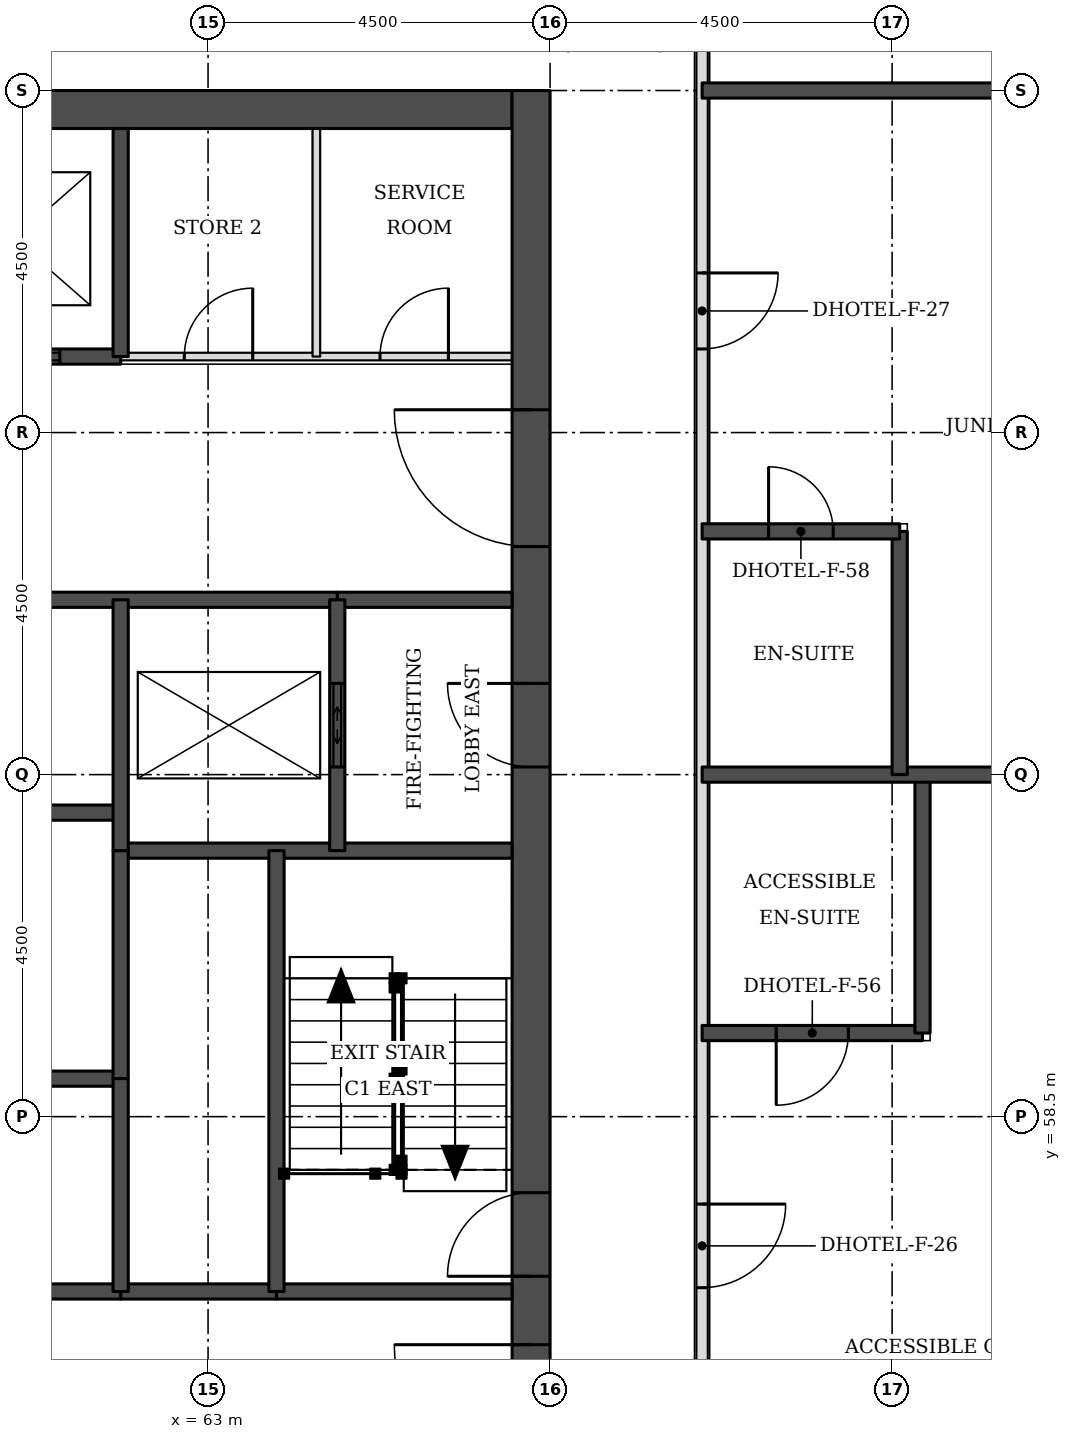
"""IFC4 building model, lengths in metres.
Left out: names, types, materials, properties, quantities, classifications, styles, units other than length and angle.
Written with IfcOpenShell. Run it as: python <this file> out.ifc"""

import sys

from ifc_helpers import new_model, si_unit, direction, frame, frame_2d, origin, place, context, subcontext, project, spatial, rectangle, extrude, element, fill, save


model = new_model("IFC4")
c1 = context("Model", 3, precision=1e-05, world=origin(), true_north=direction((0.0, 1.0)))
c2 = subcontext(c1, "Body", "Model", "MODEL_VIEW")
j1 = project(units=[si_unit("LENGTHUNIT", "METRE"), si_unit("PLANEANGLEUNIT", "RADIAN")], contexts=[c1])
p1 = place(None, origin())
s1 = spatial("IfcSite", under=j1, at=p1, CompositionType="ELEMENT")
p2 = place(p1, origin())
s2 = spatial("IfcBuilding", under=s1, at=p2, CompositionType="ELEMENT")
p3 = place(p2, frame((0.0, 0.0, 42.9)))
s3 = spatial("IfcBuildingStorey", under=s2, at=p3, CompositionType="ELEMENT", Elevation=42.9)
p4 = place(p3, frame((45.5, 71.75, 0.0), z_axis=(0.0, 0.0, 1.0), x_axis=(1.0, 0.0, 0.0)))
e1 = element("IfcWall", 1, at=p4, inside=s3, PredefinedType="SHEAR", context=c2, shape_type="SweptSolid", body=[
    extrude(rectangle(XDim=21.5, YDim=0.5, at=frame_2d((10.75, 0.0))), origin(), (0.0, 0.0, 1.0), 3.3),
])
p5 = place(p3, frame((67.25, 49.5, 0.0), z_axis=(0.0, 0.0, 1.0), x_axis=(0.0, 1.0, 0.0)))
e2 = element("IfcWall", 2, at=p5, inside=s3, PredefinedType="SHEAR", context=c2, shape_type="SweptSolid", body=[
    extrude(rectangle(XDim=22.5, YDim=0.5, at=frame_2d((11.25, 0.0))), origin(), (0.0, 0.0, 1.0), 3.3),
])
p6 = place(p5, frame((4.2, 0.0, 0.0)))
e3 = element("IfcOpeningElement", 3, at=p6, cuts=e2, PredefinedType="OPENING", context=c2, shape_type="SweptSolid", body=[
    extrude(rectangle(XDim=1.8, YDim=2.1, at=frame_2d((0.9, 1.05))), frame((0.0, 0.26, 0.0), z_axis=(0.0, -1.0, 0.0), x_axis=(1.0, 0.0, 0.0)), (0.0, 0.0, 1.0), 0.52),
])
p7 = place(p5, frame((6.9, 0.0, 0.0)))
e4 = element("IfcOpeningElement", 4, at=p7, cuts=e2, PredefinedType="OPENING", context=c2, shape_type="SweptSolid", body=[
    extrude(rectangle(XDim=1.1, YDim=2.1, at=frame_2d((0.55, 1.05))), frame((0.0, 0.26, 0.0), z_axis=(0.0, -1.0, 0.0), x_axis=(1.0, 0.0, 0.0)), (0.0, 0.0, 1.0), 0.52),
])
p8 = place(p5, frame((13.6, 0.0, 0.0)))
e5 = element("IfcOpeningElement", 5, at=p8, cuts=e2, PredefinedType="OPENING", context=c2, shape_type="SweptSolid", body=[
    extrude(rectangle(XDim=1.1, YDim=2.1, at=frame_2d((0.55, 1.05))), frame((0.0, 0.26, 0.0), z_axis=(0.0, -1.0, 0.0), x_axis=(1.0, 0.0, 0.0)), (0.0, 0.0, 1.0), 0.52),
])
p9 = place(p5, frame((16.5, 0.0, 0.0)))
e6 = element("IfcOpeningElement", 6, at=p9, cuts=e2, PredefinedType="OPENING", context=c2, shape_type="SweptSolid", body=[
    extrude(rectangle(XDim=1.8, YDim=2.1, at=frame_2d((0.9, 1.05))), frame((0.0, 0.26, 0.0), z_axis=(0.0, -1.0, 0.0), x_axis=(1.0, 0.0, 0.0)), (0.0, 0.0, 1.0), 0.52),
])
p10 = place(p3, frame((69.5, 47.5, 0.0), z_axis=(0.0, 0.0, 1.0), x_axis=(0.0, 1.0, 0.0)))
e7 = element("IfcWall", 7, at=p10, inside=s3, PredefinedType="PARTITIONING", context=c2, shape_type="SweptSolid", body=[
    extrude(rectangle(XDim=26.5, YDim=0.15, at=frame_2d((13.25, 0.0))), origin(), (0.0, 0.0, 1.0), 3.08),
])
p11 = place(p10, frame((25.053, 0.0, 0.0)))
e8 = element("IfcOpeningElement", 8, at=p11, cuts=e7, PredefinedType="OPENING", context=c2, shape_type="SweptSolid", body=[
    extrude(rectangle(XDim=1.0, YDim=2.1, at=frame_2d((0.5, 1.05))), frame((0.0, 0.085, 0.0), z_axis=(0.0, -1.0, 0.0), x_axis=(1.0, 0.0, 0.0)), (0.0, 0.0, 1.0), 0.17),
])
p12 = place(p10, frame((21.1, 0.0, 0.0)))
e9 = element("IfcOpeningElement", 9, at=p12, cuts=e7, PredefinedType="OPENING", context=c2, shape_type="SweptSolid", body=[
    extrude(rectangle(XDim=1.0, YDim=2.1, at=frame_2d((0.5, 1.05))), frame((0.0, 0.085, 0.0), z_axis=(0.0, -1.0, 0.0), x_axis=(1.0, 0.0, 0.0)), (0.0, 0.0, 1.0), 0.17),
])
p13 = place(p10, frame((8.75, 0.0, 0.0)))
e10 = element("IfcOpeningElement", 10, at=p13, cuts=e7, PredefinedType="OPENING", context=c2, shape_type="SweptSolid", body=[
    extrude(rectangle(XDim=1.1, YDim=2.1, at=frame_2d((0.55, 1.05))), frame((0.0, 0.085, 0.0), z_axis=(0.0, -1.0, 0.0), x_axis=(1.0, 0.0, 0.0)), (0.0, 0.0, 1.0), 0.17),
])
p14 = place(p10, frame((5.05, 0.0, 0.0)))
e11 = element("IfcOpeningElement", 11, at=p14, cuts=e7, PredefinedType="OPENING", context=c2, shape_type="SweptSolid", body=[
    extrude(rectangle(XDim=1.0, YDim=2.1, at=frame_2d((0.5, 1.05))), frame((0.0, 0.085, 0.0), z_axis=(0.0, -1.0, 0.0), x_axis=(1.0, 0.0, 0.0)), (0.0, 0.0, 1.0), 0.17),
])
p15 = place(p10, frame((0.447, 0.0, 0.0)))
e12 = element("IfcOpeningElement", 12, at=p15, cuts=e7, PredefinedType="OPENING", context=c2, shape_type="SweptSolid", body=[
    extrude(rectangle(XDim=1.0, YDim=2.1, at=frame_2d((0.5, 1.05))), frame((0.0, 0.085, 0.0), z_axis=(0.0, -1.0, 0.0), x_axis=(1.0, 0.0, 0.0)), (0.0, 0.0, 1.0), 0.17),
])
p16 = place(p3, frame((69.5, 59.6, 0.0), z_axis=(0.0, 0.0, 1.0), x_axis=(1.0, 0.0, 0.0)))
e13 = element("IfcWall", 13, at=p16, inside=s3, PredefinedType="SOLIDWALL", context=c2, shape_type="SweptSolid", body=[
    extrude(rectangle(XDim=2.9, YDim=0.2, at=frame_2d((1.45, 0.0))), origin(), (0.0, 0.0, 1.0), 3.08),
])
p17 = place(p16, frame((0.975, 0.0, 0.0)))
e14 = element("IfcOpeningElement", 14, at=p17, cuts=e13, PredefinedType="OPENING", context=c2, shape_type="SweptSolid", body=[
    extrude(rectangle(XDim=0.95, YDim=2.1, at=frame_2d((0.475, 1.05))), frame((0.0, 0.11, 0.0), z_axis=(0.0, -1.0, 0.0), x_axis=(1.0, 0.0, 0.0)), (0.0, 0.0, 1.0), 0.22),
])
p18 = place(p3, frame((72.4, 59.6, 0.0), z_axis=(0.0, 0.0, 1.0), x_axis=(0.0, 1.0, 0.0)))
e15 = element("IfcWall", 15, at=p18, inside=s3, PredefinedType="SOLIDWALL", context=c2, shape_type="SweptSolid", body=[
    extrude(rectangle(XDim=3.4, YDim=0.2, at=frame_2d((1.7, 0.0))), origin(), (0.0, 0.0, 1.0), 3.08),
])
p19 = place(p3, frame((69.5, 63.0, 0.0), z_axis=(0.0, 0.0, 1.0), x_axis=(1.0, 0.0, 0.0)))
e16 = element("IfcWall", 16, at=p19, inside=s3, PredefinedType="SOLIDWALL", context=c2, shape_type="SweptSolid", body=[
    extrude(rectangle(XDim=6.4, YDim=0.2, at=frame_2d((3.2, 0.0))), origin(), (0.0, 0.0, 1.0), 3.08),
])
p20 = place(p3, frame((72.1, 63.0, 0.0), z_axis=(0.0, 0.0, 1.0), x_axis=(0.0, 1.0, 0.0)))
e17 = element("IfcWall", 17, at=p20, inside=s3, PredefinedType="SOLIDWALL", context=c2, shape_type="SweptSolid", body=[
    extrude(rectangle(XDim=3.2, YDim=0.2, at=frame_2d((1.6, 0.0))), origin(), (0.0, 0.0, 1.0), 3.08),
])
p21 = place(p3, frame((69.5, 66.2, 0.0), z_axis=(0.0, 0.0, 1.0), x_axis=(1.0, 0.0, 0.0)))
e18 = element("IfcWall", 18, at=p21, inside=s3, PredefinedType="SOLIDWALL", context=c2, shape_type="SweptSolid", body=[
    extrude(rectangle(XDim=2.6, YDim=0.2, at=frame_2d((1.3, 0.0))), origin(), (0.0, 0.0, 1.0), 3.08),
])
p22 = place(p21, frame((0.875, 0.0, 0.0)))
e19 = element("IfcOpeningElement", 19, at=p22, cuts=e18, PredefinedType="OPENING", context=c2, shape_type="SweptSolid", body=[
    extrude(rectangle(XDim=0.85, YDim=2.1, at=frame_2d((0.425, 1.05))), frame((0.0, 0.11, 0.0), z_axis=(0.0, -1.0, 0.0), x_axis=(1.0, 0.0, 0.0)), (0.0, 0.0, 1.0), 0.22),
])
p23 = place(p3, frame((69.5, 72.0, 0.0), z_axis=(0.0, 0.0, 1.0), x_axis=(1.0, 0.0, 0.0)))
e20 = element("IfcWall", 20, at=p23, inside=s3, PredefinedType="SOLIDWALL", context=c2, shape_type="SweptSolid", body=[
    extrude(rectangle(XDim=6.4, YDim=0.2, at=frame_2d((3.2, 0.0))), origin(), (0.0, 0.0, 1.0), 3.08),
])
p24 = place(p3, frame((61.85, 56.2, 0.0), z_axis=(0.0, 0.0, 1.0), x_axis=(1.0, 0.0, 0.0)))
e21 = element("IfcWall", 21, at=p24, inside=s3, PredefinedType="SOLIDWALL", context=c2, shape_type="SweptSolid", body=[
    extrude(rectangle(XDim=2.05, YDim=0.2, at=frame_2d((1.025, 0.0))), origin(), (0.0, 0.0, 1.0), 3.08),
])
p25 = place(p3, frame((50.65, 56.2, 0.0), z_axis=(0.0, 0.0, 1.0), x_axis=(1.0, 0.0, 0.0)))
e22 = element("IfcWall", 22, at=p25, inside=s3, PredefinedType="SOLIDWALL", context=c2, shape_type="SweptSolid", body=[
    extrude(rectangle(XDim=11.2, YDim=0.2, at=frame_2d((5.6, 0.0))), origin(), (0.0, 0.0, 1.0), 3.08),
])
p26 = place(p3, frame((63.9, 56.2, 0.0), z_axis=(0.0, 0.0, 1.0), x_axis=(1.0, 0.0, 0.0)))
e23 = element("IfcWall", 23, at=p26, inside=s3, PredefinedType="SOLIDWALL", context=c2, shape_type="SweptSolid", body=[
    extrude(rectangle(XDim=3.1, YDim=0.2, at=frame_2d((1.55, 0.0))), origin(), (0.0, 0.0, 1.0), 3.08),
])
p27 = place(p3, frame((50.65, 59.0, 0.0), z_axis=(0.0, 0.0, 1.0), x_axis=(1.0, 0.0, 0.0)))
e24 = element("IfcWall", 24, at=p27, inside=s3, PredefinedType="SOLIDWALL", context=c2, shape_type="SweptSolid", body=[
    extrude(rectangle(XDim=11.2, YDim=0.2, at=frame_2d((5.6, 0.0))), origin(), (0.0, 0.0, 1.0), 3.3),
])
p28 = place(p3, frame((61.85, 62.0, 0.0), z_axis=(0.0, 0.0, 1.0), x_axis=(1.0, 0.0, 0.0)))
e25 = element("IfcWall", 25, at=p28, inside=s3, PredefinedType="SOLIDWALL", context=c2, shape_type="SweptSolid", body=[
    extrude(rectangle(XDim=5.15, YDim=0.2, at=frame_2d((2.575, 0.0))), origin(), (0.0, 0.0, 1.0), 3.08),
])
p29 = place(p3, frame((50.65, 62.5, 0.0), z_axis=(0.0, 0.0, 1.0), x_axis=(1.0, 0.0, 0.0)))
e26 = element("IfcWall", 26, at=p29, inside=s3, PredefinedType="SOLIDWALL", context=c2, shape_type="SweptSolid", body=[
    extrude(rectangle(XDim=11.2, YDim=0.2, at=frame_2d((5.6, 0.0))), origin(), (0.0, 0.0, 1.0), 3.3),
])
p30 = place(p3, frame((64.7, 65.3, 0.0), z_axis=(0.0, 0.0, 1.0), x_axis=(1.0, 0.0, 0.0)))
e27 = element("IfcWall", 27, at=p30, inside=s3, PredefinedType="SOLIDWALL", context=c2, shape_type="SweptSolid", body=[
    extrude(rectangle(XDim=2.3, YDim=0.2, at=frame_2d((1.15, 0.0))), origin(), (0.0, 0.0, 1.0), 3.08),
])
p31 = place(p3, frame((47.8, 65.3, 0.0), z_axis=(0.0, 0.0, 1.0), x_axis=(1.0, 0.0, 0.0)))
e28 = element("IfcWall", 28, at=p31, inside=s3, PredefinedType="SOLIDWALL", context=c2, shape_type="SweptSolid", body=[
    extrude(rectangle(XDim=16.9, YDim=0.2, at=frame_2d((8.45, 0.0))), origin(), (0.0, 0.0, 1.0), 3.08),
])
p32 = place(p3, frame((61.85, 68.5, 0.0), z_axis=(0.0, 0.0, 1.0), x_axis=(1.0, 0.0, 0.0)))
e29 = element("IfcWall", 29, at=p32, inside=s3, PredefinedType="PARTITIONING", context=c2, shape_type="SweptSolid", body=[
    extrude(rectangle(XDim=5.15, YDim=0.1, at=frame_2d((2.575, 0.0))), origin(), (0.0, 0.0, 1.0), 3.08),
])
p33 = place(p32, frame((3.413, 0.0, 0.0)))
e30 = element("IfcOpeningElement", 30, at=p33, cuts=e29, PredefinedType="OPENING", context=c2, shape_type="SweptSolid", body=[
    extrude(rectangle(XDim=0.9, YDim=2.1, at=frame_2d((0.45, 1.05))), frame((0.0, 0.06, 0.0), z_axis=(0.0, -1.0, 0.0), x_axis=(1.0, 0.0, 0.0)), (0.0, 0.0, 1.0), 0.12),
])
p34 = place(p32, frame((0.837, 0.0, 0.0)))
e31 = element("IfcOpeningElement", 31, at=p34, cuts=e29, PredefinedType="OPENING", context=c2, shape_type="SweptSolid", body=[
    extrude(rectangle(XDim=0.9, YDim=2.1, at=frame_2d((0.45, 1.05))), frame((0.0, 0.06, 0.0), z_axis=(0.0, -1.0, 0.0), x_axis=(1.0, 0.0, 0.0)), (0.0, 0.0, 1.0), 0.12),
])
p35 = place(p3, frame((50.65, 68.5, 0.0), z_axis=(0.0, 0.0, 1.0), x_axis=(1.0, 0.0, 0.0)))
e32 = element("IfcWall", 32, at=p35, inside=s3, PredefinedType="SOLIDWALL", context=c2, shape_type="SweptSolid", body=[
    extrude(rectangle(XDim=11.2, YDim=0.2, at=frame_2d((5.6, 0.0))), origin(), (0.0, 0.0, 1.0), 3.08),
])
p36 = place(p35, frame((0.8, 0.0, 0.0)))
e33 = element("IfcOpeningElement", 33, at=p36, cuts=e32, PredefinedType="OPENING", context=c2, shape_type="SweptSolid", body=[
    extrude(rectangle(XDim=1.2, YDim=2.1, at=frame_2d((0.6, 1.05))), frame((0.0, 0.11, 0.0), z_axis=(0.0, -1.0, 0.0), x_axis=(1.0, 0.0, 0.0)), (0.0, 0.0, 1.0), 0.22),
])
p37 = place(p35, frame((3.6, 0.0, 0.0)))
e34 = element("IfcOpeningElement", 34, at=p37, cuts=e32, PredefinedType="OPENING", context=c2, shape_type="SweptSolid", body=[
    extrude(rectangle(XDim=1.2, YDim=2.1, at=frame_2d((0.6, 1.05))), frame((0.0, 0.11, 0.0), z_axis=(0.0, -1.0, 0.0), x_axis=(1.0, 0.0, 0.0)), (0.0, 0.0, 1.0), 0.22),
])
p38 = place(p35, frame((6.4, 0.0, 0.0)))
e35 = element("IfcOpeningElement", 35, at=p38, cuts=e32, PredefinedType="OPENING", context=c2, shape_type="SweptSolid", body=[
    extrude(rectangle(XDim=1.2, YDim=2.1, at=frame_2d((0.6, 1.05))), frame((0.0, 0.11, 0.0), z_axis=(0.0, -1.0, 0.0), x_axis=(1.0, 0.0, 0.0)), (0.0, 0.0, 1.0), 0.22),
])
p39 = place(p35, frame((9.2, 0.0, 0.0)))
e36 = element("IfcOpeningElement", 36, at=p39, cuts=e32, PredefinedType="OPENING", context=c2, shape_type="SweptSolid", body=[
    extrude(rectangle(XDim=1.2, YDim=2.1, at=frame_2d((0.6, 1.05))), frame((0.0, 0.11, 0.0), z_axis=(0.0, -1.0, 0.0), x_axis=(1.0, 0.0, 0.0)), (0.0, 0.0, 1.0), 0.22),
])
p40 = place(p3, frame((61.85, 59.0, 0.0), z_axis=(0.0, 0.0, 1.0), x_axis=(0.0, 1.0, 0.0)))
e37 = element("IfcWall", 37, at=p40, inside=s3, PredefinedType="SOLIDWALL", context=c2, shape_type="SweptSolid", body=[
    extrude(rectangle(XDim=3.0, YDim=0.2, at=frame_2d((1.5, 0.0))), origin(), (0.0, 0.0, 1.0), 3.3),
])
p41 = place(p3, frame((61.85, 56.2, 0.0), z_axis=(0.0, 0.0, 1.0), x_axis=(0.0, 1.0, 0.0)))
e38 = element("IfcWall", 38, at=p41, inside=s3, PredefinedType="SOLIDWALL", context=c2, shape_type="SweptSolid", body=[
    extrude(rectangle(XDim=2.8, YDim=0.2, at=frame_2d((1.4, 0.0))), origin(), (0.0, 0.0, 1.0), 3.08),
])
p42 = place(p3, frame((61.85, 62.0, 0.0), z_axis=(0.0, 0.0, 1.0), x_axis=(0.0, 1.0, 0.0)))
e39 = element("IfcWall", 39, at=p42, inside=s3, PredefinedType="SOLIDWALL", context=c2, shape_type="SweptSolid", body=[
    extrude(rectangle(XDim=3.3, YDim=0.2, at=frame_2d((1.65, 0.0))), origin(), (0.0, 0.0, 1.0), 3.08),
])
p43 = place(p3, frame((61.85, 68.5, 0.0), z_axis=(0.0, 0.0, 1.0), x_axis=(0.0, 1.0, 0.0)))
e40 = element("IfcWall", 40, at=p43, inside=s3, PredefinedType="SOLIDWALL", context=c2, shape_type="SweptSolid", body=[
    extrude(rectangle(XDim=3.0, YDim=0.2, at=frame_2d((1.5, 0.0))), origin(), (0.0, 0.0, 1.0), 3.08),
])
p44 = place(p3, frame((63.9, 56.2, 0.0), z_axis=(0.0, 0.0, 1.0), x_axis=(0.0, 1.0, 0.0)))
e41 = element("IfcWall", 41, at=p44, inside=s3, PredefinedType="SOLIDWALL", context=c2, shape_type="SweptSolid", body=[
    extrude(rectangle(XDim=5.8, YDim=0.2, at=frame_2d((2.9, 0.0))), origin(), (0.0, 0.0, 1.0), 3.08),
])
p45 = place(p3, frame((64.425, 68.5, 0.0), z_axis=(0.0, 0.0, 1.0), x_axis=(0.0, 1.0, 0.0)))
e42 = element("IfcWall", 42, at=p45, inside=s3, PredefinedType="PARTITIONING", context=c2, shape_type="SweptSolid", body=[
    extrude(rectangle(XDim=3.0, YDim=0.1, at=frame_2d((1.5, 0.0))), origin(), (0.0, 0.0, 1.0), 3.08),
])
p46 = place(p3, frame((64.7, 62.0, 0.0), z_axis=(0.0, 0.0, 1.0), x_axis=(0.0, 1.0, 0.0)))
e43 = element("IfcWall", 43, at=p46, inside=s3, PredefinedType="SOLIDWALL", context=c2, shape_type="SweptSolid", body=[
    extrude(rectangle(XDim=3.3, YDim=0.2, at=frame_2d((1.65, 0.0))), origin(), (0.0, 0.0, 1.0), 3.08),
])
p47 = place(p46, frame((1.1, 0.0, 0.0)))
e44 = element("IfcOpeningElement", 44, at=p47, cuts=e43, PredefinedType="OPENING", context=c2, shape_type="SweptSolid", body=[
    extrude(rectangle(XDim=1.1, YDim=2.1, at=frame_2d((0.55, 1.05))), frame((0.0, 0.11, 0.0), z_axis=(0.0, -1.0, 0.0), x_axis=(1.0, 0.0, 0.0)), (0.0, 0.0, 1.0), 0.22),
])
p48 = place(p12, frame((1.0, 0.0, 0.0), z_axis=(0.0, 0.0, 1.0), x_axis=(-1.0, 0.0, 0.0)))
e45 = element("IfcDoor", 45, at=p48, inside=s3, OperationType="SINGLE_SWING_LEFT", PredefinedType="DOOR", context=c2, shape_type="SweptSolid", body=[
    extrude(rectangle(XDim=1.0, YDim=2.1, at=frame_2d((0.5, 1.05))), frame((0.0, 0.025, 0.0), z_axis=(0.0, -1.0, 0.0), x_axis=(1.0, 0.0, 0.0)), (0.0, 0.0, 1.0), 0.05),
])
fill(e9, e45)
p49 = place(p22, origin())
e46 = element("IfcDoor", 46, at=p49, inside=s3, OperationType="SINGLE_SWING_LEFT", PredefinedType="DOOR", context=c2, shape_type="SweptSolid", body=[
    extrude(rectangle(XDim=0.85, YDim=2.1, at=frame_2d((0.425, 1.05))), frame((0.0, 0.025, 0.0), z_axis=(0.0, -1.0, 0.0), x_axis=(1.0, 0.0, 0.0)), (0.0, 0.0, 1.0), 0.05),
])
fill(e19, e46)
p50 = place(p13, frame((1.1, 0.0, 0.0), z_axis=(0.0, 0.0, 1.0), x_axis=(-1.0, 0.0, 0.0)))
e47 = element("IfcDoor", 47, at=p50, inside=s3, OperationType="SINGLE_SWING_LEFT", PredefinedType="DOOR", context=c2, shape_type="SweptSolid", body=[
    extrude(rectangle(XDim=1.1, YDim=2.1, at=frame_2d((0.55, 1.05))), frame((0.0, 0.025, 0.0), z_axis=(0.0, -1.0, 0.0), x_axis=(1.0, 0.0, 0.0)), (0.0, 0.0, 1.0), 0.05),
])
fill(e10, e47)
p51 = place(p17, frame((0.95, 0.0, 0.0), z_axis=(0.0, 0.0, 1.0), x_axis=(-1.0, 0.0, 0.0)))
e48 = element("IfcDoor", 48, at=p51, inside=s3, OperationType="SINGLE_SWING_RIGHT", PredefinedType="DOOR", context=c2, shape_type="SweptSolid", body=[
    extrude(rectangle(XDim=0.95, YDim=2.1, at=frame_2d((0.475, 1.05))), frame((0.0, 0.025, 0.0), z_axis=(0.0, -1.0, 0.0), x_axis=(1.0, 0.0, 0.0)), (0.0, 0.0, 1.0), 0.05),
])
fill(e14, e48)
p52 = place(p39, origin())
e49 = element("IfcDoor", 49, at=p52, inside=s3, OperationType="DOUBLE_DOOR_SLIDING", PredefinedType="DOOR", context=c2, shape_type="SweptSolid", body=[
    extrude(rectangle(XDim=1.2, YDim=2.1, at=frame_2d((0.6, 1.05))), frame((0.0, 0.025, 0.0), z_axis=(0.0, -1.0, 0.0), x_axis=(1.0, 0.0, 0.0)), (0.0, 0.0, 1.0), 0.05),
])
fill(e36, e49)
p53 = place(p47, origin())
e50 = element("IfcDoor", 50, at=p53, inside=s3, OperationType="DOUBLE_DOOR_SLIDING", PredefinedType="DOOR", context=c2, shape_type="SweptSolid", body=[
    extrude(rectangle(XDim=1.1, YDim=2.1, at=frame_2d((0.55, 1.05))), frame((0.0, 0.025, 0.0), z_axis=(0.0, -1.0, 0.0), x_axis=(1.0, 0.0, 0.0)), (0.0, 0.0, 1.0), 0.05),
])
fill(e44, e50)
p54 = place(p6, origin())
e51 = element("IfcDoor", 51, at=p54, inside=s3, OperationType="SINGLE_SWING_RIGHT", PredefinedType="DOOR", context=c2, shape_type="SweptSolid", body=[
    extrude(rectangle(XDim=1.8, YDim=2.1, at=frame_2d((0.9, 1.05))), frame((0.0, 0.025, 0.0), z_axis=(0.0, -1.0, 0.0), x_axis=(1.0, 0.0, 0.0)), (0.0, 0.0, 1.0), 0.05),
])
fill(e3, e51)
p55 = place(p7, origin())
e52 = element("IfcDoor", 52, at=p55, inside=s3, OperationType="SINGLE_SWING_LEFT", PredefinedType="DOOR", context=c2, shape_type="SweptSolid", body=[
    extrude(rectangle(XDim=1.1, YDim=2.1, at=frame_2d((0.55, 1.05))), frame((0.0, 0.025, 0.0), z_axis=(0.0, -1.0, 0.0), x_axis=(1.0, 0.0, 0.0)), (0.0, 0.0, 1.0), 0.05),
])
fill(e4, e52)
p56 = place(p8, origin())
e53 = element("IfcDoor", 53, at=p56, inside=s3, OperationType="SINGLE_SWING_RIGHT", PredefinedType="DOOR", context=c2, shape_type="SweptSolid", body=[
    extrude(rectangle(XDim=1.1, YDim=2.1, at=frame_2d((0.55, 1.05))), frame((0.0, 0.025, 0.0), z_axis=(0.0, -1.0, 0.0), x_axis=(1.0, 0.0, 0.0)), (0.0, 0.0, 1.0), 0.05),
])
fill(e5, e53)
p57 = place(p9, origin())
e54 = element("IfcDoor", 54, at=p57, inside=s3, OperationType="SINGLE_SWING_RIGHT", PredefinedType="DOOR", context=c2, shape_type="SweptSolid", body=[
    extrude(rectangle(XDim=1.8, YDim=2.1, at=frame_2d((0.9, 1.05))), frame((0.0, 0.025, 0.0), z_axis=(0.0, -1.0, 0.0), x_axis=(1.0, 0.0, 0.0)), (0.0, 0.0, 1.0), 0.05),
])
fill(e6, e54)
p58 = place(p33, origin())
e55 = element("IfcDoor", 55, at=p58, inside=s3, OperationType="SINGLE_SWING_RIGHT", PredefinedType="DOOR", context=c2, shape_type="SweptSolid", body=[
    extrude(rectangle(XDim=0.9, YDim=2.1, at=frame_2d((0.45, 1.05))), frame((0.0, 0.025, 0.0), z_axis=(0.0, -1.0, 0.0), x_axis=(1.0, 0.0, 0.0)), (0.0, 0.0, 1.0), 0.05),
])
fill(e30, e55)
p59 = place(p34, origin())
e56 = element("IfcDoor", 56, at=p59, inside=s3, OperationType="SINGLE_SWING_RIGHT", PredefinedType="DOOR", context=c2, shape_type="SweptSolid", body=[
    extrude(rectangle(XDim=0.9, YDim=2.1, at=frame_2d((0.45, 1.05))), frame((0.0, 0.025, 0.0), z_axis=(0.0, -1.0, 0.0), x_axis=(1.0, 0.0, 0.0)), (0.0, 0.0, 1.0), 0.05),
])
fill(e31, e56)
save(model, sys.argv[1])
